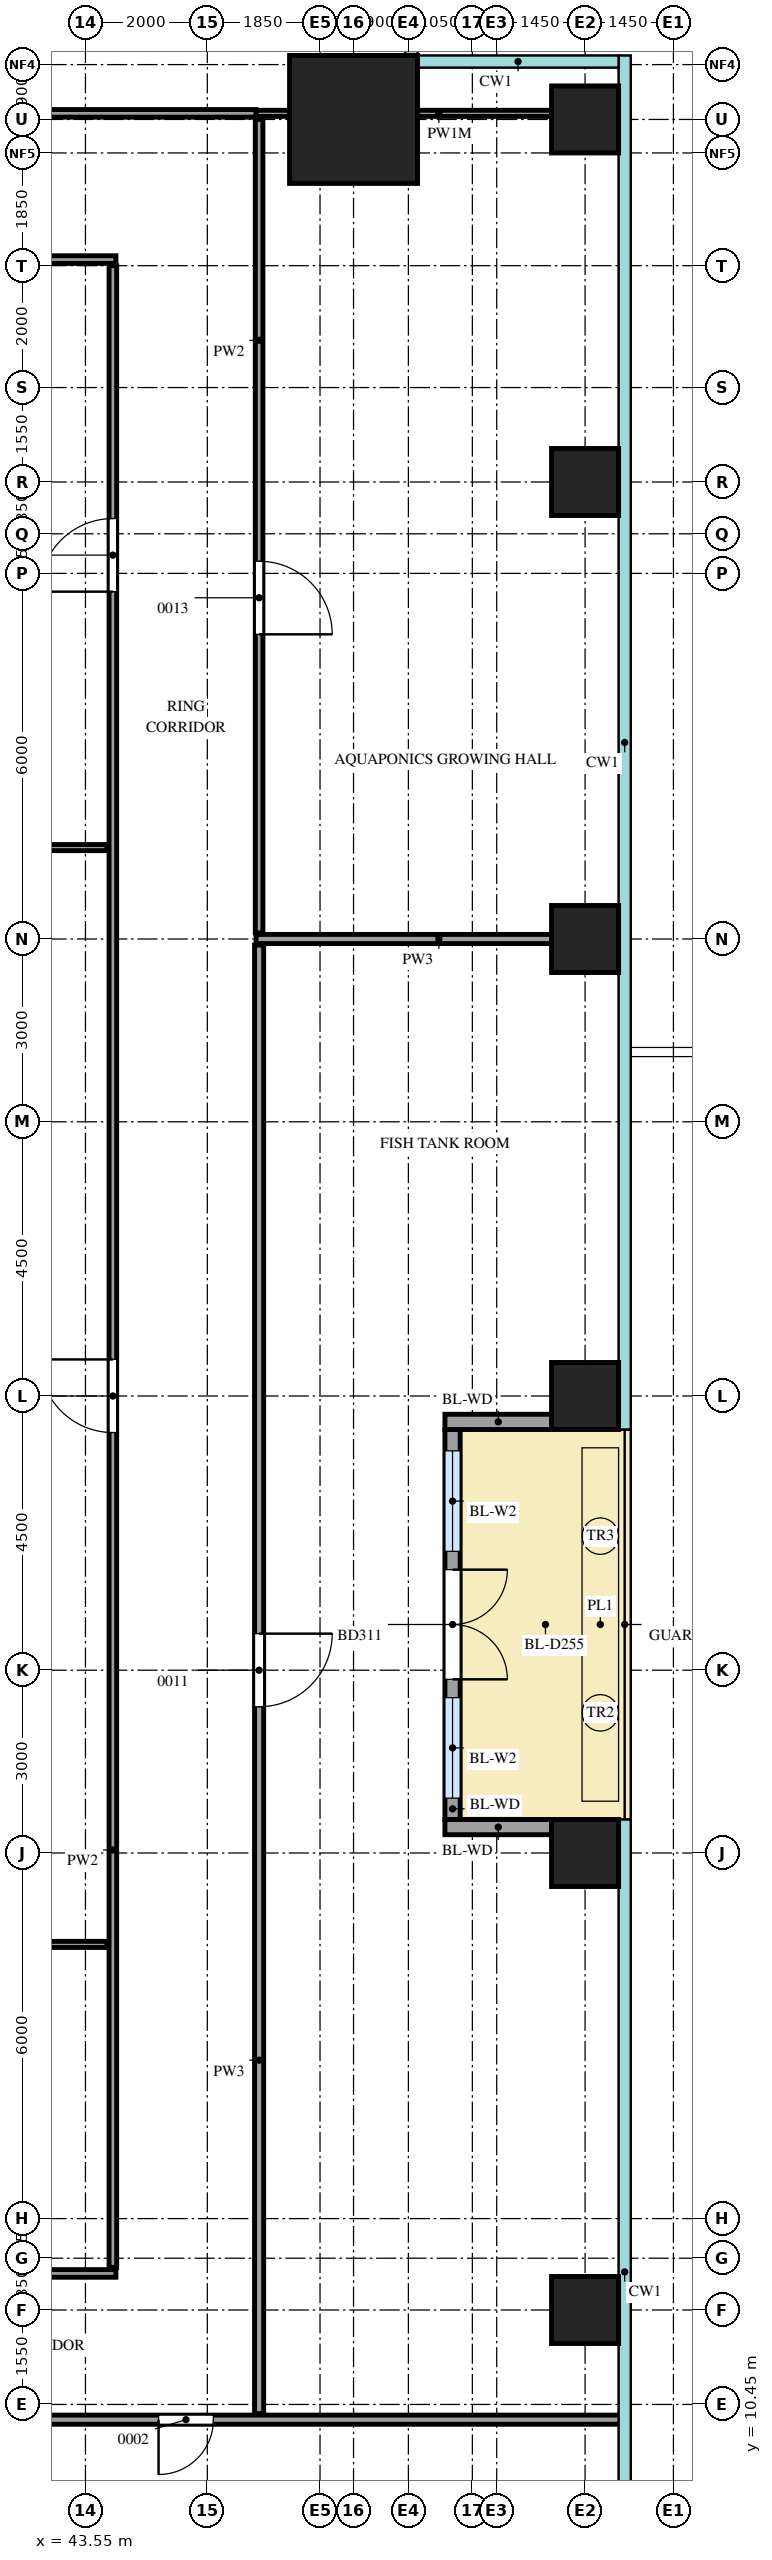
"""IFC4 building model, lengths in metres.
Left out: names, types, materials, properties, quantities, classifications, styles, units other than length and angle.
Written with IfcOpenShell. Run it as: python <this file> out.ifc"""

import sys

from ifc_helpers import new_model, si_unit, direction, frame, frame_2d, origin, origin_2d, place, context, subcontext, project, spatial, rectangle, extrude, source, transform, mapped, element, fill, save


model = new_model("IFC4")
c1 = context("Model", 3, precision=1e-05, world=origin(), true_north=direction((0.0, 1.0)))
c2 = subcontext(c1, "Body", "Model", "MODEL_VIEW")
j1 = project(units=[si_unit("LENGTHUNIT", "METRE"), si_unit("PLANEANGLEUNIT", "RADIAN")], contexts=[c1])
p1 = place(None, origin())
s1 = spatial("IfcSite", under=j1, at=p1, CompositionType="ELEMENT")
p2 = place(p1, origin())
s2 = spatial("IfcBuilding", under=s1, at=p2, CompositionType="ELEMENT")
p3 = place(p2, frame((0.0, 0.0, 145.5)))
s3 = spatial("IfcBuildingStorey", under=s2, at=p3, CompositionType="ELEMENT", Elevation=145.5)
m1 = source(origin(), c2, "Body", "SweptSolid", [
    extrude(rectangle(XDim=2.1, YDim=2.1, at=origin_2d()), origin(), (0.0, 0.0, 1.0), 4.4),
])
p4 = place(p3, frame((47.95, 47.95, 0.0), z_axis=(0.0, 0.0, 1.0), x_axis=(1.0, 0.0, 0.0)))
e1 = element("IfcColumn", 1, at=p4, inside=s3, PredefinedType="COLUMN", context=c2, shape_type="MappedRepresentation", body=[
    mapped(m1, transform((0.0, 0.0, 0.0))),
])
m2 = source(origin(), c2, "Body", "SweptSolid", [
    extrude(rectangle(XDim=1.1, YDim=1.1, at=origin_2d()), origin(), (0.0, 0.0, 1.0), 4.1),
])
for number, where, z_axis, x_axis in (
    (2, (51.75, 12.0, 0.0), (0.0, 0.0, 1.0), (1.0, 0.0, 0.0)),
    (3, (51.75, 19.5, 0.0), (0.0, 0.0, 1.0), (1.0, 0.0, 0.0)),
    (4, (51.75, 27.0, 0.0), (0.0, 0.0, 1.0), (1.0, 0.0, 0.0)),
    (5, (51.75, 34.5, 0.0), (0.0, 0.0, 1.0), (1.0, 0.0, 0.0)),
    (6, (51.75, 42.0, 0.0), (0.0, 0.0, 1.0), (1.0, 0.0, 0.0)),
    (7, (51.75, 47.95, 0.0), (0.0, 0.0, 1.0), (1.0, 0.0, 0.0)),
):
    element("IfcColumn", number, at=place(p3, frame(where, z_axis=z_axis, x_axis=x_axis)), inside=s3, PredefinedType="COLUMN", context=c2, shape_type="MappedRepresentation", body=[
        mapped(m2, transform((0.0, 0.0, 0.0))),
    ])
m3 = source(origin(), c2, "Body", "SweptSolid", [
    extrude(rectangle(XDim=6.4, YDim=0.25, at=frame_2d((3.2, 0.0))), origin(), (0.0, 0.0, 1.0), 3.55),
])
p5 = place(p3, frame((49.575, 20.05, 0.0), z_axis=(0.0, 0.0, 1.0), x_axis=(0.0, 1.0, 0.0)))
e8 = element("IfcWall", 8, at=p5, inside=s3, PredefinedType="SOLIDWALL", context=c2, shape_type="MappedRepresentation", body=[
    mapped(m3, transform((0.0, 0.0, 0.0))),
])
m4 = source(origin(), c2, "Body", "SweptSolid", [
    extrude(rectangle(XDim=1.65, YDim=2.4, at=frame_2d((0.825, 1.2))), frame((0.0, 0.135, 0.0), z_axis=(0.0, -1.0, 0.0), x_axis=(1.0, 0.0, 0.0)), (0.0, 0.0, 1.0), 0.27),
])
p6 = place(p5, frame((0.35, 0.0, 0.0)))
e9 = element("IfcOpeningElement", 9, at=p6, cuts=e8, PredefinedType="OPENING", context=c2, shape_type="MappedRepresentation", body=[
    mapped(m4, transform((0.0, 0.0, 0.0))),
])
p7 = place(p5, frame((4.4, 0.0, 0.0)))
e10 = element("IfcOpeningElement", 10, at=p7, cuts=e8, PredefinedType="OPENING", context=c2, shape_type="MappedRepresentation", body=[
    mapped(m4, transform((0.0, 0.0, 0.0))),
])
m5 = source(origin(), c2, "Body", "SweptSolid", [
    extrude(rectangle(XDim=1.8, YDim=2.4, at=frame_2d((0.9, 1.2))), frame((0.0, 0.135, 0.0), z_axis=(0.0, -1.0, 0.0), x_axis=(1.0, 0.0, 0.0)), (0.0, 0.0, 1.0), 0.27),
])
p8 = place(p5, frame((2.3, 0.0, 0.0)))
e11 = element("IfcOpeningElement", 11, at=p8, cuts=e8, PredefinedType="OPENING", context=c2, shape_type="MappedRepresentation", body=[
    mapped(m5, transform((0.0, 0.0, 0.0))),
])
m6 = source(origin(), c2, "Body", "SweptSolid", [
    extrude(rectangle(XDim=1.75, YDim=0.25, at=frame_2d((0.875, 0.0))), origin(), (0.0, 0.0, 1.0), 3.55),
])
for number, where, z_axis, x_axis in (
    (12, (51.2, 19.925, 0.0), (0.0, 0.0, 1.0), (-1.0, 0.0, 0.0)),
    (13, (51.2, 26.575, 0.0), (0.0, 0.0, 1.0), (-1.0, 0.0, 0.0)),
):
    element("IfcWall", number, at=place(p3, frame(where, z_axis=z_axis, x_axis=x_axis)), inside=s3, PredefinedType="SOLIDWALL", context=c2, shape_type="MappedRepresentation", body=[
        mapped(m6, transform((0.0, 0.0, 0.0))),
    ])
m7 = source(origin(), c2, "Body", "SweptSolid", [
    extrude(rectangle(XDim=26.0, YDim=0.15, at=frame_2d((13.0, 0.0))), origin(), (0.0, 0.0, 1.0), 4.2),
])
p9 = place(p3, frame((26.35, 10.2, 0.0), z_axis=(0.0, 0.0, 1.0), x_axis=(1.0, 0.0, 0.0)))
e14 = element("IfcWall", 14, at=p9, inside=s3, PredefinedType="PARTITIONING", context=c2, shape_type="MappedRepresentation", body=[
    mapped(m7, transform((0.0, 0.0, 0.0))),
])
m8 = source(origin(), c2, "Body", "SweptSolid", [
    extrude(rectangle(XDim=1.2, YDim=2.1, at=frame_2d((0.6, 1.05))), frame((0.0, 0.085, 0.0), z_axis=(0.0, -1.0, 0.0), x_axis=(1.0, 0.0, 0.0)), (0.0, 0.0, 1.0), 0.17),
])
p10 = place(p9, frame((7.25, 0.0, 0.0)))
e15 = element("IfcOpeningElement", 15, at=p10, cuts=e14, PredefinedType="OPENING", context=c2, shape_type="MappedRepresentation", body=[
    mapped(m8, transform((0.0, 0.0, 0.0))),
])
m9 = source(origin(), c2, "Body", "SweptSolid", [
    extrude(rectangle(XDim=0.9, YDim=2.1, at=frame_2d((0.45, 1.05))), frame((0.0, 0.085, 0.0), z_axis=(0.0, -1.0, 0.0), x_axis=(1.0, 0.0, 0.0)), (0.0, 0.0, 1.0), 0.17),
])
p11 = place(p9, frame((18.4, 0.0, 0.0)))
e16 = element("IfcOpeningElement", 16, at=p11, cuts=e14, PredefinedType="OPENING", context=c2, shape_type="MappedRepresentation", body=[
    mapped(m9, transform((0.0, 0.0, 0.0))),
])
m10 = source(origin(), c2, "Body", "SweptSolid", [
    extrude(rectangle(XDim=24.1, YDim=0.15, at=frame_2d((12.05, 0.0))), origin(), (0.0, 0.0, 1.0), 4.2),
])
p12 = place(p3, frame((46.4, 10.3, 0.0), z_axis=(0.0, 0.0, 1.0), x_axis=(0.0, 1.0, 0.0)))
e17 = element("IfcWall", 17, at=p12, inside=s3, PredefinedType="PARTITIONING", context=c2, shape_type="MappedRepresentation", body=[
    mapped(m10, transform((0.0, 0.0, 0.0))),
])
p13 = place(p12, frame((11.6, 0.0, 0.0)))
e18 = element("IfcOpeningElement", 18, at=p13, cuts=e17, PredefinedType="OPENING", context=c2, shape_type="MappedRepresentation", body=[
    mapped(m8, transform((0.0, 0.0, 0.0))),
])
m11 = source(origin(), c2, "Body", "SweptSolid", [
    extrude(rectangle(XDim=17.7, YDim=0.125, at=frame_2d((8.85, 0.0))), origin(), (0.0, 0.0, 1.0), 4.2),
])
p14 = place(p3, frame((26.35, 12.6, 0.0), z_axis=(0.0, 0.0, 1.0), x_axis=(1.0, 0.0, 0.0)))
e19 = element("IfcWall", 19, at=p14, inside=s3, PredefinedType="PARTITIONING", context=c2, shape_type="MappedRepresentation", body=[
    mapped(m11, transform((0.0, 0.0, 0.0))),
])
m12 = source(origin(), c2, "Body", "SweptSolid", [
    extrude(rectangle(XDim=32.85, YDim=0.125, at=frame_2d((16.425, 0.0))), origin(), (0.0, 0.0, 1.0), 4.2),
])
p15 = place(p3, frame((44.0, 12.7, 0.0), z_axis=(0.0, 0.0, 1.0), x_axis=(0.0, 1.0, 0.0)))
e20 = element("IfcWall", 20, at=p15, inside=s3, PredefinedType="PARTITIONING", context=c2, shape_type="MappedRepresentation", body=[
    mapped(m12, transform((0.0, 0.0, 0.0))),
])
m13 = source(origin(), c2, "Body", "SweptSolid", [
    extrude(rectangle(XDim=1.2, YDim=2.1, at=frame_2d((0.6, 1.05))), frame((0.0, 0.073, 0.0), z_axis=(0.0, -1.0, 0.0), x_axis=(1.0, 0.0, 0.0)), (0.0, 0.0, 1.0), 0.145),
])
p16 = place(p15, frame((13.7, 0.0, 0.0)))
e21 = element("IfcOpeningElement", 21, at=p16, cuts=e20, PredefinedType="OPENING", context=c2, shape_type="MappedRepresentation", body=[
    mapped(m13, transform((0.0, 0.0, 0.0))),
])
p17 = place(p15, frame((27.5, 0.0, 0.0)))
e22 = element("IfcOpeningElement", 22, at=p17, cuts=e20, PredefinedType="OPENING", context=c2, shape_type="MappedRepresentation", body=[
    mapped(m13, transform((0.0, 0.0, 0.0))),
])
m14 = source(origin(), c2, "Body", "SweptSolid", [
    extrude(rectangle(XDim=17.4, YDim=0.1, at=frame_2d((8.7, 0.0))), origin(), (0.0, 0.0, 1.0), 4.2),
])
p18 = place(p3, frame((26.5, 18.0, 0.0), z_axis=(0.0, 0.0, 1.0), x_axis=(1.0, 0.0, 0.0)))
e23 = element("IfcWall", 23, at=p18, inside=s3, PredefinedType="PARTITIONING", context=c2, shape_type="MappedRepresentation", body=[
    mapped(m14, transform((0.0, 0.0, 0.0))),
])
m15 = source(origin(), c2, "Body", "SweptSolid", [
    extrude(rectangle(XDim=6.0, YDim=0.15, at=frame_2d((3.0, 0.0))), origin(), (0.0, 0.0, 1.0), 4.2),
])
p19 = place(p3, frame((46.35, 34.5, 0.0), z_axis=(0.0, 0.0, 1.0), x_axis=(1.0, 0.0, 0.0)))
e24 = element("IfcWall", 24, at=p19, inside=s3, PredefinedType="PARTITIONING", context=c2, shape_type="MappedRepresentation", body=[
    mapped(m15, transform((0.0, 0.0, 0.0))),
])
m16 = source(origin(), c2, "Body", "SweptSolid", [
    extrude(rectangle(XDim=13.35, YDim=0.125, at=frame_2d((6.675, 0.0))), origin(), (0.0, 0.0, 1.0), 4.2),
])
p20 = place(p3, frame((46.4, 34.6, 0.0), z_axis=(0.0, 0.0, 1.0), x_axis=(0.0, 1.0, 0.0)))
e25 = element("IfcWall", 25, at=p20, inside=s3, PredefinedType="PARTITIONING", context=c2, shape_type="MappedRepresentation", body=[
    mapped(m16, transform((0.0, 0.0, 0.0))),
])
p21 = place(p20, frame((4.9, 0.0, 0.0)))
e26 = element("IfcOpeningElement", 26, at=p21, cuts=e25, PredefinedType="OPENING", context=c2, shape_type="MappedRepresentation", body=[
    mapped(m13, transform((0.0, 0.0, 0.0))),
])
m17 = source(origin(), c2, "Body", "SweptSolid", [
    extrude(rectangle(XDim=13.35, YDim=0.1, at=frame_2d((6.675, 0.0))), origin(), (0.0, 0.0, 1.0), 4.2),
])
p22 = place(p3, frame((30.55, 36.0, 0.0), z_axis=(0.0, 0.0, 1.0), x_axis=(1.0, 0.0, 0.0)))
e27 = element("IfcWall", 27, at=p22, inside=s3, PredefinedType="PARTITIONING", context=c2, shape_type="MappedRepresentation", body=[
    mapped(m17, transform((0.0, 0.0, 0.0))),
])
m18 = source(origin(), c2, "Body", "SweptSolid", [
    extrude(rectangle(XDim=13.5, YDim=0.125, at=frame_2d((6.75, 0.0))), origin(), (0.0, 0.0, 1.0), 4.2),
])
p23 = place(p3, frame((30.55, 45.65, 0.0), z_axis=(0.0, 0.0, 1.0), x_axis=(1.0, 0.0, 0.0)))
e28 = element("IfcWall", 28, at=p23, inside=s3, PredefinedType="PARTITIONING", context=c2, shape_type="MappedRepresentation", body=[
    mapped(m18, transform((0.0, 0.0, 0.0))),
])
m19 = source(origin(), c2, "Body", "SweptSolid", [
    extrude(rectangle(XDim=42.05, YDim=0.125, at=frame_2d((21.025, 0.0))), origin(), (0.0, 0.0, 1.0), 3.55),
])
p24 = place(p3, frame((4.3, 48.05, 0.0), z_axis=(0.0, 0.0, 1.0), x_axis=(1.0, 0.0, 0.0)))
e29 = element("IfcWall", 29, at=p24, inside=s3, PredefinedType="PARTITIONING", context=c2, shape_type="MappedRepresentation", body=[
    mapped(m19, transform((0.0, 0.0, 0.0))),
])
m20 = source(origin(), c2, "Body", "SweptSolid", [
    extrude(rectangle(XDim=0.9, YDim=2.1, at=frame_2d((0.45, 1.05))), frame((0.0, 0.073, 0.0), z_axis=(0.0, -1.0, 0.0), x_axis=(1.0, 0.0, 0.0)), (0.0, 0.0, 1.0), 0.145),
])
p25 = place(p24, frame((7.1, 0.0, 0.0)))
e30 = element("IfcOpeningElement", 30, at=p25, cuts=e29, PredefinedType="OPENING", context=c2, shape_type="MappedRepresentation", body=[
    mapped(m20, transform((0.0, 0.0, 0.0))),
])
p26 = place(p24, frame((28.2, 0.0, 0.0)))
e31 = element("IfcOpeningElement", 31, at=p26, cuts=e29, PredefinedType="OPENING", context=c2, shape_type="MappedRepresentation", body=[
    mapped(m13, transform((0.0, 0.0, 0.0))),
])
m21 = source(origin(), c2, "Body", "SweptSolid", [
    extrude(rectangle(XDim=6.0, YDim=0.1, at=frame_2d((3.0, 0.0))), origin(), (0.0, 0.0, 1.0), 3.55),
])
p27 = place(p3, frame((46.35, 48.05, 0.0), z_axis=(0.0, 0.0, 1.0), x_axis=(1.0, 0.0, 0.0)))
e32 = element("IfcWall", 32, at=p27, inside=s3, PredefinedType="PARTITIONING", context=c2, shape_type="MappedRepresentation", body=[
    mapped(m21, transform((0.0, 0.0, 0.0))),
])
m22 = source(origin(), c2, "Body", "SweptSolid", [
    extrude(rectangle(XDim=1.65, YDim=2.4, at=frame_2d((0.825, 1.2))), frame((0.0, 0.03, 0.0), z_axis=(0.0, -1.0, 0.0), x_axis=(1.0, 0.0, 0.0)), (0.0, 0.0, 1.0), 0.06),
])
p28 = place(p6, origin())
e33 = element("IfcWindow", 33, at=p28, inside=s3, PartitioningType="SINGLE_PANEL", PredefinedType="WINDOW", context=c2, shape_type="MappedRepresentation", body=[
    mapped(m22, transform((0.0, 0.0, 0.0))),
])
fill(e9, e33)
p29 = place(p7, origin())
e34 = element("IfcWindow", 34, at=p29, inside=s3, PartitioningType="SINGLE_PANEL", PredefinedType="WINDOW", context=c2, shape_type="MappedRepresentation", body=[
    mapped(m22, transform((0.0, 0.0, 0.0))),
])
fill(e10, e34)
m23 = source(origin(), c2, "Body", "SweptSolid", [
    extrude(rectangle(XDim=1.8, YDim=2.4, at=frame_2d((0.9, 1.2))), frame((0.0, 0.025, 0.0), z_axis=(0.0, -1.0, 0.0), x_axis=(1.0, 0.0, 0.0)), (0.0, 0.0, 1.0), 0.05),
])
p30 = place(p8, origin())
e35 = element("IfcDoor", 35, at=p30, inside=s3, OperationType="DOUBLE_DOOR_DOUBLE_SWING", PredefinedType="DOOR", context=c2, shape_type="MappedRepresentation", body=[
    mapped(m23, transform((0.0, 0.0, 0.0))),
])
fill(e11, e35)
m24 = source(origin(), c2, "Body", "SweptSolid", [
    extrude(rectangle(XDim=0.9, YDim=2.1, at=frame_2d((0.45, 1.05))), frame((0.0, 0.025, 0.0), z_axis=(0.0, -1.0, 0.0), x_axis=(1.0, 0.0, 0.0)), (0.0, 0.0, 1.0), 0.05),
])
p31 = place(p11, origin())
e36 = element("IfcDoor", 36, at=p31, inside=s3, OperationType="SINGLE_SWING_LEFT", PredefinedType="DOOR", context=c2, shape_type="MappedRepresentation", body=[
    mapped(m24, transform((0.0, 0.0, 0.0))),
])
fill(e16, e36)
m25 = source(origin(), c2, "Body", "SweptSolid", [
    extrude(rectangle(XDim=1.2, YDim=2.1, at=frame_2d((0.6, 1.05))), frame((0.0, 0.025, 0.0), z_axis=(0.0, -1.0, 0.0), x_axis=(1.0, 0.0, 0.0)), (0.0, 0.0, 1.0), 0.05),
])
p32 = place(p16, origin())
e37 = element("IfcDoor", 37, at=p32, inside=s3, OperationType="SINGLE_SWING_LEFT", PredefinedType="DOOR", context=c2, shape_type="MappedRepresentation", body=[
    mapped(m25, transform((0.0, 0.0, 0.0))),
])
fill(e21, e37)
p33 = place(p17, origin())
e38 = element("IfcDoor", 38, at=p33, inside=s3, OperationType="SINGLE_SWING_RIGHT", PredefinedType="DOOR", context=c2, shape_type="MappedRepresentation", body=[
    mapped(m25, transform((0.0, 0.0, 0.0))),
])
fill(e22, e38)
p34 = place(p13, origin())
e39 = element("IfcDoor", 39, at=p34, inside=s3, OperationType="SINGLE_SWING_RIGHT", PredefinedType="DOOR", context=c2, shape_type="MappedRepresentation", body=[
    mapped(m25, transform((0.0, 0.0, 0.0))),
])
fill(e18, e39)
p35 = place(p21, origin())
e40 = element("IfcDoor", 40, at=p35, inside=s3, OperationType="SINGLE_SWING_LEFT", PredefinedType="DOOR", context=c2, shape_type="MappedRepresentation", body=[
    mapped(m25, transform((0.0, 0.0, 0.0))),
])
fill(e26, e40)
save(model, sys.argv[1])
